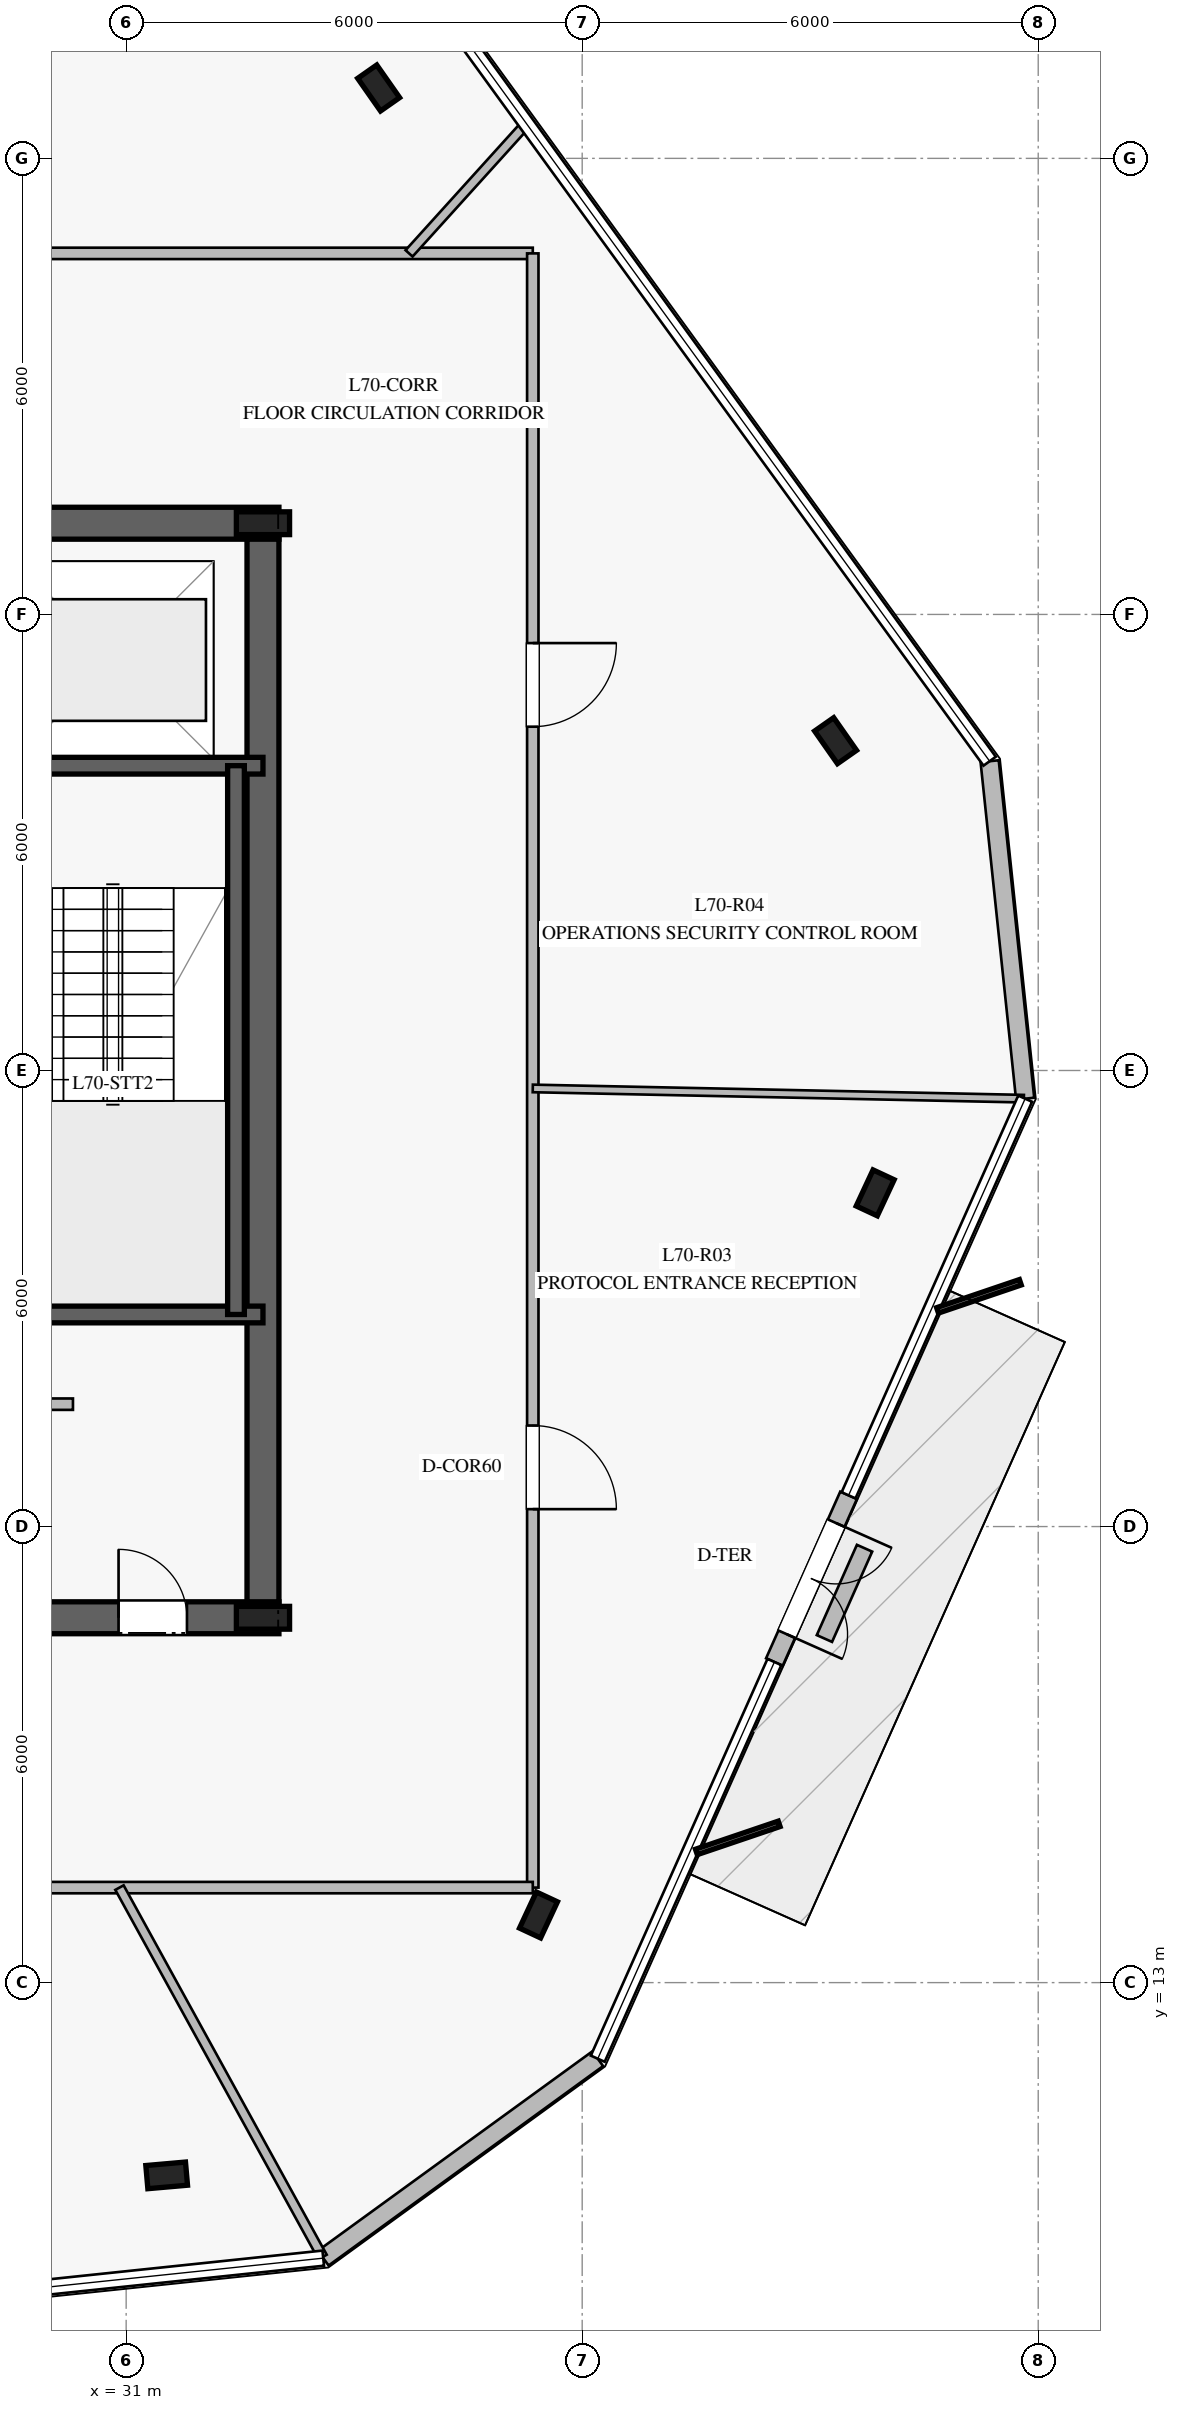
"""IFC4 building model, lengths in metres.
Left out: names, types, materials, properties, quantities, classifications, styles, units other than length and angle.
Written with IfcOpenShell. Run it as: python <this file> out.ifc"""

import sys

from ifc_helpers import new_model, si_unit, direction, frame, frame_2d, origin, origin_2d, place, context, subcontext, project, spatial, rectangle, i_section, extrude, element, fill, save


model = new_model("IFC4")
c1 = context("Model", 3, precision=1e-05, world=origin(), true_north=direction((0.0, 1.0)))
c2 = subcontext(c1, "Body", "Model", "MODEL_VIEW")
j1 = project(units=[si_unit("LENGTHUNIT", "METRE"), si_unit("PLANEANGLEUNIT", "RADIAN")], contexts=[c1])
p1 = place(None, origin())
s1 = spatial("IfcSite", under=j1, at=p1, CompositionType="ELEMENT")
p2 = place(p1, origin())
s2 = spatial("IfcBuilding", under=s1, at=p2, CompositionType="ELEMENT")
p3 = place(p2, frame((0.0, 0.0, 290.2)))
s3 = spatial("IfcBuildingStorey", under=s2, at=p3, CompositionType="ELEMENT", Elevation=290.2)
p4 = place(p3, frame((16.99, 17.8, 0.0), z_axis=(0.0, 0.0, 1.0), x_axis=(1.0, 0.0, 0.0)))
e1 = element("IfcWall", 1, at=p4, inside=s3, PredefinedType="SHEAR", context=c2, shape_type="SweptSolid", body=[
    extrude(rectangle(XDim=16.02, YDim=0.42, at=frame_2d((8.01, 0.0))), origin(), (0.0, 0.0, 1.0), 3.78),
])
p5 = place(p4, frame((4.96, 0.0, 0.0)))
e2 = element("IfcOpeningElement", 2, at=p5, cuts=e1, PredefinedType="OPENING", context=c2, shape_type="SweptSolid", body=[
    extrude(rectangle(XDim=1.2, YDim=2.25, at=frame_2d((0.6, 1.125))), frame((0.0, 0.22, 0.0), z_axis=(0.0, -1.0, 0.0), x_axis=(1.0, 0.0, 0.0)), (0.0, 0.0, 1.0), 0.44),
])
p6 = place(p4, frame((13.91, 0.0, 0.0)))
e3 = element("IfcOpeningElement", 3, at=p6, cuts=e1, PredefinedType="OPENING", context=c2, shape_type="SweptSolid", body=[
    extrude(rectangle(XDim=0.9, YDim=2.1, at=frame_2d((0.45, 1.05))), frame((0.0, 0.22, 0.0), z_axis=(0.0, -1.0, 0.0), x_axis=(1.0, 0.0, 0.0)), (0.0, 0.0, 1.0), 0.44),
])
p7 = place(p4, frame((9.16, 0.0, 0.0)))
e4 = element("IfcOpeningElement", 4, at=p7, cuts=e1, PredefinedType="OPENING", context=c2, shape_type="SweptSolid", body=[
    extrude(rectangle(XDim=1.1, YDim=2.2, at=frame_2d((0.55, 1.1))), frame((0.0, 0.22, 0.0), z_axis=(0.0, -1.0, 0.0), x_axis=(1.0, 0.0, 0.0)), (0.0, 0.0, 1.0), 0.44),
])
p8 = place(p3, frame((33.01, 32.2, 0.0), z_axis=(0.0, 0.0, 1.0), x_axis=(-1.0, 0.0, 0.0)))
e5 = element("IfcWall", 5, at=p8, inside=s3, PredefinedType="SHEAR", context=c2, shape_type="SweptSolid", body=[
    extrude(rectangle(XDim=16.02, YDim=0.42, at=frame_2d((8.01, 0.0))), origin(), (0.0, 0.0, 1.0), 3.78),
])
p9 = place(p8, frame((4.96, 0.0, 0.0)))
e6 = element("IfcOpeningElement", 6, at=p9, cuts=e5, PredefinedType="OPENING", context=c2, shape_type="SweptSolid", body=[
    extrude(rectangle(XDim=1.2, YDim=2.25, at=frame_2d((0.6, 1.125))), frame((0.0, 0.22, 0.0), z_axis=(0.0, -1.0, 0.0), x_axis=(1.0, 0.0, 0.0)), (0.0, 0.0, 1.0), 0.44),
])
p10 = place(p8, frame((9.785, 0.0, 0.0)))
e7 = element("IfcOpeningElement", 7, at=p10, cuts=e5, PredefinedType="OPENING", context=c2, shape_type="SweptSolid", body=[
    extrude(rectangle(XDim=1.1, YDim=2.2, at=frame_2d((0.55, 1.1))), frame((0.0, 0.22, 0.0), z_axis=(0.0, -1.0, 0.0), x_axis=(1.0, 0.0, 0.0)), (0.0, 0.0, 1.0), 0.44),
])
p11 = place(p3, frame((32.8, 18.01, 0.0), z_axis=(0.0, 0.0, 1.0), x_axis=(0.0, 1.0, 0.0)))
e8 = element("IfcWall", 8, at=p11, inside=s3, PredefinedType="SHEAR", context=c2, shape_type="SweptSolid", body=[
    extrude(rectangle(XDim=13.98, YDim=0.42, at=frame_2d((6.99, 0.0))), origin(), (0.0, 0.0, 1.0), 3.78),
])
for number, where, z_axis, x_axis in (
    (9, (32.8, 17.8, 0.0), (0.0, 0.0, 1.0), (1.0, 0.0, 0.0)),
    (10, (32.8, 32.2, 0.0), (0.0, 0.0, 1.0), (1.0, 0.0, 0.0)),
):
    element("IfcColumn", number, at=place(p3, frame(where, z_axis=z_axis, x_axis=x_axis)), inside=s3, PredefinedType="COLUMN", context=c2, shape_type="SweptSolid", body=[
        extrude(i_section(OverallWidth=0.3, OverallDepth=0.7, WebThickness=0.017, FlangeThickness=0.032, at=origin_2d()), origin(), (0.0, 0.0, 1.0), 4.0),
    ])
for number, where, z_axis, x_axis in (
    (11, (29.08, 21.79, 0.0), (0.0, 0.0, 1.0), (1.0, 0.0, 0.0)),
    (12, (29.08, 29.01, 0.0), (0.0, 0.0, 1.0), (1.0, 0.0, 0.0)),
):
    element("IfcWall", number, at=place(p3, frame(where, z_axis=z_axis, x_axis=x_axis)), inside=s3, PredefinedType="SOLIDWALL", context=c2, shape_type="SweptSolid", body=[
        extrude(rectangle(XDim=3.72, YDim=0.22, at=frame_2d((1.86, 0.0))), origin(), (0.0, 0.0, 1.0), 3.78),
    ])
p12 = place(p3, frame((32.445, 29.01, 0.0), z_axis=(0.0, 0.0, 1.0), x_axis=(0.0, -1.0, 0.0)))
e13 = element("IfcWall", 13, at=p12, inside=s3, PredefinedType="SOLIDWALL", context=c2, shape_type="SweptSolid", body=[
    extrude(rectangle(XDim=7.22, YDim=0.22, at=frame_2d((3.61, 0.0))), origin(), (0.0, 0.0, 1.0), 3.78),
])
for number, where, z_axis, x_axis in (
    (14, (31.533, 10.464, 0.0), (0.0, 0.0, 1.0), (0.996, 0.087, 0.0)),
    (15, (36.425, 13.89, 0.0), (0.0, 0.0, 1.0), (0.423, 0.906, 0.0)),
    (16, (40.855, 23.39, 0.0), (0.0, 0.0, 1.0), (0.423, 0.906, 0.0)),
    (17, (40.334, 29.339, 0.0), (0.0, 0.0, 1.0), (-0.574, 0.819, 0.0)),
    (18, (34.322, 37.926, 0.0), (0.0, 0.0, 1.0), (-0.574, 0.819, 0.0)),
):
    element("IfcColumn", number, at=place(p3, frame(where, z_axis=z_axis, x_axis=x_axis)), inside=s3, PredefinedType="COLUMN", context=c2, shape_type="SweptSolid", body=[
        extrude(i_section(OverallWidth=0.306, OverallDepth=0.524, WebThickness=0.021, FlangeThickness=0.04, at=origin_2d()), origin(), (0.0, 0.0, 1.0), 4.0),
    ])
p13 = place(p3, frame((33.593, 9.375, 0.0), z_axis=(0.0, 0.0, 1.0), x_axis=(0.809048111957, 0.587742420231, 0.0)))
e19 = element("IfcWall", 19, at=p13, inside=s3, PredefinedType="STANDARD", context=c2, shape_type="SweptSolid", body=[
    extrude(rectangle(XDim=4.465, YDim=0.24, at=frame_2d((2.232, 0.0))), origin(), (0.0, 0.0, 1.0), 3.78),
])
p14 = place(p3, frame((39.529, 17.218, 0.0), z_axis=(0.0, 0.0, 1.0), x_axis=(0.406563117163, 0.913622696611, 0.0)))
e20 = element("IfcWall", 20, at=p14, inside=s3, PredefinedType="STANDARD", context=c2, shape_type="SweptSolid", body=[
    extrude(rectangle(XDim=2.4, YDim=0.24, at=frame_2d((1.2, 0.0))), origin(), (0.0, 0.0, 1.0), 3.78),
])
p15 = place(p14, frame((0.4, 0.0, 0.0)))
e21 = element("IfcOpeningElement", 21, at=p15, cuts=e20, PredefinedType="OPENING", context=c2, shape_type="SweptSolid", body=[
    extrude(rectangle(XDim=1.6, YDim=2.25, at=frame_2d((0.8, 1.125))), frame((0.0, 0.13, 0.0), z_axis=(0.0, -1.0, 0.0), x_axis=(1.0, 0.0, 0.0)), (0.0, 0.0, 1.0), 0.26),
])
p16 = place(p3, frame((42.828, 24.629, 0.0), z_axis=(0.0, 0.0, 1.0), x_axis=(-0.104553844109, 0.994519227407, 0.0)))
e22 = element("IfcWall", 22, at=p16, inside=s3, PredefinedType="STANDARD", context=c2, shape_type="SweptSolid", body=[
    extrude(rectangle(XDim=4.465, YDim=0.24, at=frame_2d((2.232, 0.0))), origin(), (0.0, 0.0, 1.0), 3.78),
])
p17 = place(p3, frame((40.187, 17.527, 0.0), z_axis=(0.0, 0.0, 1.0), x_axis=(0.406190736957, 0.913788315317, 0.0)))
e23 = element("IfcWall", 23, at=p17, inside=s3, PredefinedType="USERDEFINED", context=c2, shape_type="SweptSolid", body=[
    extrude(rectangle(XDim=1.3, YDim=0.22, at=frame_2d((0.65, 0.0))), origin(), (0.0, 0.0, 1.0), 0.4),
])
p18 = place(p3, frame((24.4, 20.61, 0.0), z_axis=(0.0, 0.0, 1.0), x_axis=(1.0, 0.0, 0.0)))
e24 = element("IfcWall", 24, at=p18, inside=s3, PredefinedType="PARTITIONING", context=c2, shape_type="SweptSolid", body=[
    extrude(rectangle(XDim=5.9, YDim=0.15, at=frame_2d((2.95, 0.0))), origin(), (0.0, 0.0, 1.0), 3.78),
])
p19 = place(p3, frame((13.65, 35.75, 0.0), z_axis=(0.0, 0.0, 1.0), x_axis=(1.0, 0.0, 0.0)))
e25 = element("IfcWall", 25, at=p19, inside=s3, PredefinedType="PARTITIONING", context=c2, shape_type="SweptSolid", body=[
    extrude(rectangle(XDim=22.7, YDim=0.15, at=frame_2d((11.35, 0.0))), origin(), (0.0, 0.0, 1.0), 3.28),
])
p20 = place(p19, frame((14.356, 0.0, 0.0)))
e26 = element("IfcOpeningElement", 26, at=p20, cuts=e25, PredefinedType="OPENING", context=c2, shape_type="SweptSolid", body=[
    extrude(rectangle(XDim=1.1, YDim=2.2, at=frame_2d((0.55, 1.1))), frame((0.0, 0.085, 0.0), z_axis=(0.0, -1.0, 0.0), x_axis=(1.0, 0.0, 0.0)), (0.0, 0.0, 1.0), 0.17),
])
p21 = place(p19, frame((3.871, 0.0, 0.0)))
e27 = element("IfcOpeningElement", 27, at=p21, cuts=e25, PredefinedType="OPENING", context=c2, shape_type="SweptSolid", body=[
    extrude(rectangle(XDim=1.1, YDim=2.2, at=frame_2d((0.55, 1.1))), frame((0.0, 0.085, 0.0), z_axis=(0.0, -1.0, 0.0), x_axis=(1.0, 0.0, 0.0)), (0.0, 0.0, 1.0), 0.17),
])
p22 = place(p3, frame((36.35, 35.75, 0.0), z_axis=(0.0, 0.0, 1.0), x_axis=(0.0, -1.0, 0.0)))
e28 = element("IfcWall", 28, at=p22, inside=s3, PredefinedType="PARTITIONING", context=c2, shape_type="SweptSolid", body=[
    extrude(rectangle(XDim=21.5, YDim=0.15, at=frame_2d((10.75, 0.0))), origin(), (0.0, 0.0, 1.0), 3.05),
])
p23 = place(p22, frame((15.421, 0.0, 0.0)))
e29 = element("IfcOpeningElement", 29, at=p23, cuts=e28, PredefinedType="OPENING", context=c2, shape_type="SweptSolid", body=[
    extrude(rectangle(XDim=1.1, YDim=2.2, at=frame_2d((0.55, 1.1))), frame((0.0, 0.085, 0.0), z_axis=(0.0, -1.0, 0.0), x_axis=(1.0, 0.0, 0.0)), (0.0, 0.0, 1.0), 0.17),
])
p24 = place(p22, frame((5.127, 0.0, 0.0)))
e30 = element("IfcOpeningElement", 30, at=p24, cuts=e28, PredefinedType="OPENING", context=c2, shape_type="SweptSolid", body=[
    extrude(rectangle(XDim=1.1, YDim=2.2, at=frame_2d((0.55, 1.1))), frame((0.0, 0.085, 0.0), z_axis=(0.0, -1.0, 0.0), x_axis=(1.0, 0.0, 0.0)), (0.0, 0.0, 1.0), 0.17),
])
p25 = place(p3, frame((36.35, 14.25, 0.0), z_axis=(0.0, 0.0, 1.0), x_axis=(-1.0, 0.0, 0.0)))
e31 = element("IfcWall", 31, at=p25, inside=s3, PredefinedType="PARTITIONING", context=c2, shape_type="SweptSolid", body=[
    extrude(rectangle(XDim=22.7, YDim=0.15, at=frame_2d((11.35, 0.0))), origin(), (0.0, 0.0, 1.0), 3.28),
])
p26 = place(p25, frame((17.926, 0.0, 0.0)))
e32 = element("IfcOpeningElement", 32, at=p26, cuts=e31, PredefinedType="OPENING", context=c2, shape_type="SweptSolid", body=[
    extrude(rectangle(XDim=1.1, YDim=2.2, at=frame_2d((0.55, 1.1))), frame((0.0, 0.085, 0.0), z_axis=(0.0, -1.0, 0.0), x_axis=(1.0, 0.0, 0.0)), (0.0, 0.0, 1.0), 0.17),
])
p27 = place(p25, frame((9.458, 0.0, 0.0)))
e33 = element("IfcOpeningElement", 33, at=p27, cuts=e31, PredefinedType="OPENING", context=c2, shape_type="SweptSolid", body=[
    extrude(rectangle(XDim=1.1, YDim=2.2, at=frame_2d((0.55, 1.1))), frame((0.0, 0.085, 0.0), z_axis=(0.0, -1.0, 0.0), x_axis=(1.0, 0.0, 0.0)), (0.0, 0.0, 1.0), 0.17),
])
p28 = place(p3, frame((30.912, 14.25, 0.0), z_axis=(0.0, 0.0, 1.0), x_axis=(0.481754828114, -0.876306045619, 0.0)))
e34 = element("IfcWall", 34, at=p28, inside=s3, PredefinedType="PARTITIONING", context=c2, shape_type="SweptSolid", body=[
    extrude(rectangle(XDim=5.546, YDim=0.125, at=frame_2d((2.773, 0.0))), origin(), (0.0, 0.0, 1.0), 3.28),
])
p29 = place(p3, frame((36.35, 24.764, 0.0), z_axis=(0.0, 0.0, 1.0), x_axis=(0.999781743548, -0.020891751216, 0.0)))
e35 = element("IfcWall", 35, at=p29, inside=s3, PredefinedType="MOVABLE", context=c2, shape_type="SweptSolid", body=[
    extrude(rectangle(XDim=6.462, YDim=0.1, at=frame_2d((3.231, 0.0))), origin(), (0.0, 0.0, 1.0), 3.28),
])
p30 = place(p3, frame((34.722, 35.75, 0.0), z_axis=(0.0, 0.0, 1.0), x_axis=(0.670832257331, 0.741609117072, 0.0)))
e36 = element("IfcWall", 36, at=p30, inside=s3, PredefinedType="PARTITIONING", context=c2, shape_type="SweptSolid", body=[
    extrude(rectangle(XDim=2.287, YDim=0.125, at=frame_2d((1.144, 0.0))), origin(), (0.0, 0.0, 1.0), 3.28),
])
p31 = place(p15, frame((1.6, 0.0, 0.0), z_axis=(0.0, 0.0, 1.0), x_axis=(-1.0, 0.0, 0.0)))
e37 = element("IfcDoor", 37, at=p31, inside=s3, OperationType="DOUBLE_DOOR_SINGLE_SWING", PredefinedType="DOOR", context=c2, shape_type="SweptSolid", body=[
    extrude(rectangle(XDim=1.6, YDim=2.25, at=frame_2d((0.8, 1.125))), frame((0.0, 0.025, 0.0), z_axis=(0.0, -1.0, 0.0), x_axis=(1.0, 0.0, 0.0)), (0.0, 0.0, 1.0), 0.05),
])
fill(e21, e37)
p32 = place(p6, origin())
e38 = element("IfcDoor", 38, at=p32, inside=s3, OperationType="SINGLE_SWING_LEFT", PredefinedType="DOOR", context=c2, shape_type="SweptSolid", body=[
    extrude(rectangle(XDim=0.9, YDim=2.1, at=frame_2d((0.45, 1.05))), frame((0.0, 0.025, 0.0), z_axis=(0.0, -1.0, 0.0), x_axis=(1.0, 0.0, 0.0)), (0.0, 0.0, 1.0), 0.05),
])
fill(e3, e38)
p33 = place(p23, origin())
e39 = element("IfcDoor", 39, at=p33, inside=s3, OperationType="SINGLE_SWING_RIGHT", PredefinedType="DOOR", context=c2, shape_type="SweptSolid", body=[
    extrude(rectangle(XDim=1.1, YDim=2.2, at=frame_2d((0.55, 1.1))), frame((0.0, 0.025, 0.0), z_axis=(0.0, -1.0, 0.0), x_axis=(1.0, 0.0, 0.0)), (0.0, 0.0, 1.0), 0.05),
])
fill(e29, e39)
p34 = place(p24, origin())
e40 = element("IfcDoor", 40, at=p34, inside=s3, OperationType="SINGLE_SWING_LEFT", PredefinedType="DOOR", context=c2, shape_type="SweptSolid", body=[
    extrude(rectangle(XDim=1.1, YDim=2.2, at=frame_2d((0.55, 1.1))), frame((0.0, 0.025, 0.0), z_axis=(0.0, -1.0, 0.0), x_axis=(1.0, 0.0, 0.0)), (0.0, 0.0, 1.0), 0.05),
])
fill(e30, e40)
save(model, sys.argv[1])
